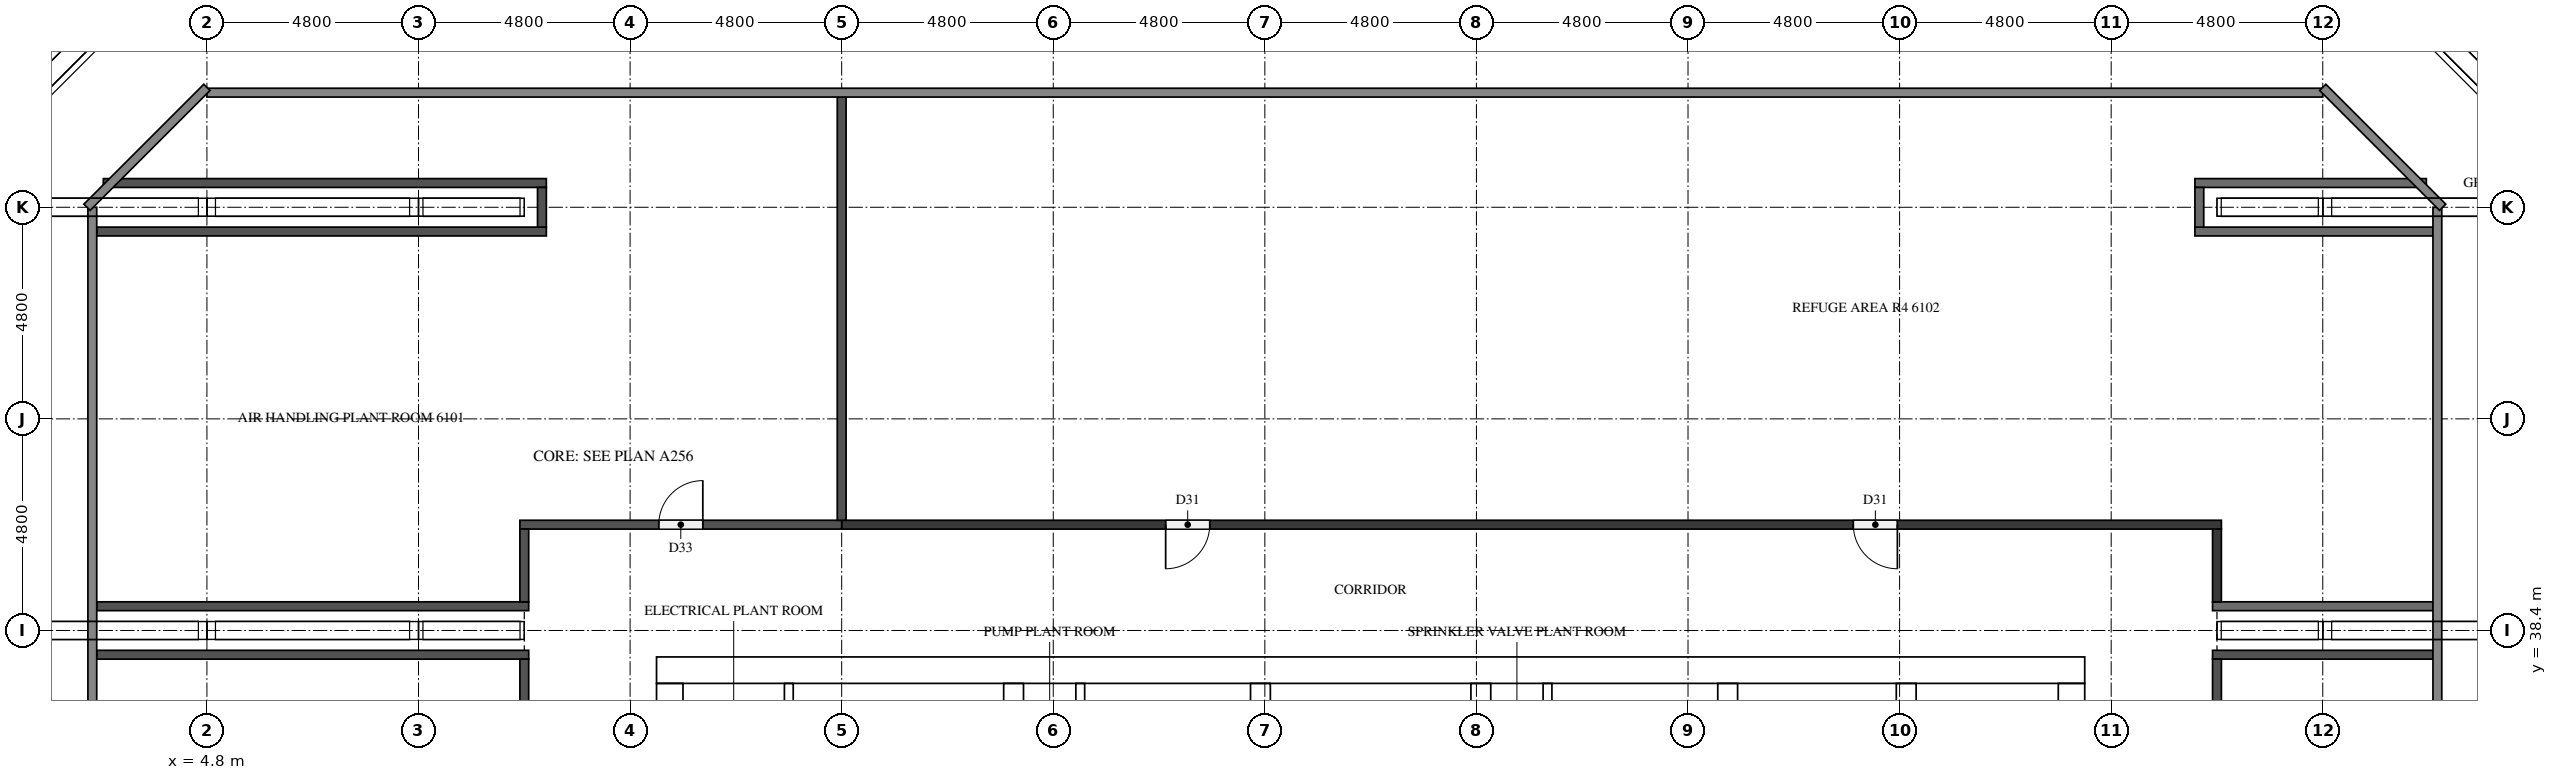
"""IFC4 building model, lengths in metres.
Left out: names, types, materials, properties, quantities, classifications, styles, units other than length and angle.
Written with IfcOpenShell. Run it as: python <this file> out.ifc"""

import sys

from ifc_helpers import new_model, si_unit, direction, frame, frame_2d, origin, place, context, subcontext, project, spatial, rectangle, extrude, element, fill, save


model = new_model("IFC4")
c1 = context("Model", 3, precision=1e-05, world=origin(), true_north=direction((0.0, 1.0)))
c2 = subcontext(c1, "Body", "Model", "MODEL_VIEW")
j1 = project(units=[si_unit("LENGTHUNIT", "METRE"), si_unit("PLANEANGLEUNIT", "RADIAN")], contexts=[c1])
p1 = place(None, origin())
s1 = spatial("IfcSite", under=j1, at=p1, CompositionType="ELEMENT")
p2 = place(p1, origin())
s2 = spatial("IfcBuilding", under=s1, at=p2, CompositionType="ELEMENT")
p3 = place(p2, frame((0.0, 0.0, 233.3)))
s3 = spatial("IfcBuildingStorey", under=s2, at=p3, CompositionType="ELEMENT", Elevation=233.3)
p4 = place(p3, frame((15.0, 37.5, 0.0), z_axis=(0.0, 0.0, 1.0), x_axis=(1.0, 0.0, 0.0)))
e1 = element("IfcWall", 1, at=p4, inside=s3, PredefinedType="SHEAR", context=c2, shape_type="SweptSolid", body=[
    extrude(rectangle(XDim=32.4, YDim=0.6, at=frame_2d((16.2, 0.0))), origin(), (0.0, 0.0, 1.0), 5.1),
])
p5 = place(p4, frame((15.3, 0.0, 0.0)))
e2 = element("IfcOpeningElement", 2, at=p5, cuts=e1, PredefinedType="OPENING", context=c2, shape_type="SweptSolid", body=[
    extrude(rectangle(XDim=1.8, YDim=2.1, at=frame_2d((0.9, 1.05))), frame((0.0, 0.31, 0.0), z_axis=(0.0, -1.0, 0.0), x_axis=(1.0, 0.0, 0.0)), (0.0, 0.0, 1.0), 0.62),
])
p6 = place(p4, frame((1.25, 0.0, 0.0)))
e3 = element("IfcOpeningElement", 3, at=p6, cuts=e1, PredefinedType="OPENING", context=c2, shape_type="SweptSolid", body=[
    extrude(rectangle(XDim=1.0, YDim=2.1, at=frame_2d((0.5, 1.05))), frame((0.0, 0.31, 0.0), z_axis=(0.0, -1.0, 0.0), x_axis=(1.0, 0.0, 0.0)), (0.0, 0.0, 1.0), 0.62),
])
p7 = place(p4, frame((4.988, 0.0, 0.0)))
e4 = element("IfcOpeningElement", 4, at=p7, cuts=e1, PredefinedType="OPENING", context=c2, shape_type="SweptSolid", body=[
    extrude(rectangle(XDim=1.0, YDim=2.1, at=frame_2d((0.5, 1.05))), frame((0.0, 0.31, 0.0), z_axis=(0.0, -1.0, 0.0), x_axis=(1.0, 0.0, 0.0)), (0.0, 0.0, 1.0), 0.62),
])
p8 = place(p3, frame((15.3, 15.6, 0.0), z_axis=(0.0, 0.0, 1.0), x_axis=(0.0, 1.0, 0.0)))
e5 = element("IfcWall", 5, at=p8, inside=s3, PredefinedType="SHEAR", context=c2, shape_type="SweptSolid", body=[
    extrude(rectangle(XDim=21.6, YDim=0.6, at=frame_2d((10.8, 0.0))), origin(), (0.0, 0.0, 1.0), 5.1),
])
p9 = place(p8, frame((5.16, 0.0, 0.0)))
e6 = element("IfcOpeningElement", 6, at=p9, cuts=e5, PredefinedType="OPENING", context=c2, shape_type="SweptSolid", body=[
    extrude(rectangle(XDim=1.2, YDim=2.1, at=frame_2d((0.6, 1.05))), frame((0.0, 0.31, 0.0), z_axis=(0.0, -1.0, 0.0), x_axis=(1.0, 0.0, 0.0)), (0.0, 0.0, 1.0), 0.62),
])
p10 = place(p3, frame((47.1, 15.6, 0.0), z_axis=(0.0, 0.0, 1.0), x_axis=(0.0, 1.0, 0.0)))
e7 = element("IfcWall", 7, at=p10, inside=s3, PredefinedType="SHEAR", context=c2, shape_type="SweptSolid", body=[
    extrude(rectangle(XDim=21.6, YDim=0.6, at=frame_2d((10.8, 0.0))), origin(), (0.0, 0.0, 1.0), 5.1),
])
p11 = place(p10, frame((10.5, 0.0, 0.0)))
e8 = element("IfcOpeningElement", 8, at=p11, cuts=e7, PredefinedType="OPENING", context=c2, shape_type="SweptSolid", body=[
    extrude(rectangle(XDim=1.2, YDim=2.1, at=frame_2d((0.6, 1.05))), frame((0.0, 0.31, 0.0), z_axis=(0.0, -1.0, 0.0), x_axis=(1.0, 0.0, 0.0)), (0.0, 0.0, 1.0), 0.62),
])
p12 = place(p3, frame((23.1, 15.6, 0.0), z_axis=(0.0, 0.0, 1.0), x_axis=(0.0, 1.0, 0.0)))
e9 = element("IfcWall", 9, at=p12, inside=s3, PredefinedType="SHEAR", context=c2, shape_type="SweptSolid", body=[
    extrude(rectangle(XDim=21.6, YDim=0.45, at=frame_2d((10.8, 0.0))), origin(), (0.0, 0.0, 1.0), 5.1),
])
p13 = place(p3, frame((39.3, 27.75, 0.0), z_axis=(0.0, 0.0, 1.0), x_axis=(0.0, 1.0, 0.0)))
e10 = element("IfcWall", 10, at=p13, inside=s3, PredefinedType="SHEAR", context=c2, shape_type="SweptSolid", body=[
    extrude(rectangle(XDim=9.45, YDim=0.45, at=frame_2d((4.725, 0.0))), origin(), (0.0, 0.0, 1.0), 5.1),
])
p14 = place(p3, frame((43.35, 27.75, 0.0), z_axis=(0.0, 0.0, 1.0), x_axis=(0.0, 1.0, 0.0)))
e11 = element("IfcWall", 11, at=p14, inside=s3, PredefinedType="SHEAR", context=c2, shape_type="SweptSolid", body=[
    extrude(rectangle(XDim=9.45, YDim=0.45, at=frame_2d((4.725, 0.0))), origin(), (0.0, 0.0, 1.0), 5.1),
])
p15 = place(p14, frame((7.65, 0.0, 0.0)))
e12 = element("IfcOpeningElement", 12, at=p15, cuts=e11, PredefinedType="OPENING", context=c2, shape_type="SweptSolid", body=[
    extrude(rectangle(XDim=1.2, YDim=2.1, at=frame_2d((0.6, 1.05))), frame((0.0, 0.235, 0.0), z_axis=(0.0, -1.0, 0.0), x_axis=(1.0, 0.0, 0.0)), (0.0, 0.0, 1.0), 0.47),
])
for number, where, z_axis, x_axis in (
    (13, (28.7, 33.775, 0.0), (0.0, 0.0, 1.0), (0.0, 1.0, 0.0)),
    (14, (33.7, 33.775, 0.0), (0.0, 0.0, 1.0), (0.0, 1.0, 0.0)),
):
    element("IfcWall", number, at=place(p3, frame(where, z_axis=z_axis, x_axis=x_axis)), inside=s3, PredefinedType="SHEAR", context=c2, shape_type="SweptSolid", body=[
        extrude(rectangle(XDim=3.425, YDim=0.45, at=frame_2d((1.712, 0.0))), origin(), (0.0, 0.0, 1.0), 5.1),
    ])
p16 = place(p3, frame((18.001, 31.475, 0.0), z_axis=(0.0, 0.0, 1.0), x_axis=(0.0, 1.0, 0.0)))
e15 = element("IfcWall", 15, at=p16, inside=s3, PredefinedType="PARTITIONING", context=c2, shape_type="SweptSolid", body=[
    extrude(rectangle(XDim=5.725, YDim=0.2, at=frame_2d((2.862, 0.0))), origin(), (0.0, 0.0, 1.0), 5.1),
])
for number, where, z_axis, x_axis in (
    (16, (24.613, 33.775, 0.0), (0.0, 0.0, 1.0), (0.0, 1.0, 0.0)),
    (17, (35.212, 33.775, 0.0), (0.0, 0.0, 1.0), (0.0, 1.0, 0.0)),
):
    element("IfcWall", number, at=place(p3, frame(where, z_axis=z_axis, x_axis=x_axis)), inside=s3, PredefinedType="PARTITIONING", context=c2, shape_type="SweptSolid", body=[
        extrude(rectangle(XDim=3.425, YDim=0.2, at=frame_2d((1.712, 0.0))), origin(), (0.0, 0.0, 1.0), 5.1),
    ])
p17 = place(p3, frame((2.3, 37.85, 0.0), z_axis=(0.0, 0.0, 1.0), x_axis=(1.0, 0.0, 0.0)))
e18 = element("IfcWall", 18, at=p17, inside=s3, PredefinedType="PARTITIONING", context=c2, shape_type="SweptSolid", body=[
    extrude(rectangle(XDim=9.8, YDim=0.2, at=frame_2d((4.9, 0.0))), origin(), (0.0, 0.0, 1.0), 5.1),
])
for number, where, z_axis, x_axis in (
    (19, (50.3, 37.85, 0.0), (0.0, 0.0, 1.0), (1.0, 0.0, 0.0)),
    (20, (50.3, 38.95, 0.0), (0.0, 0.0, 1.0), (1.0, 0.0, 0.0)),
):
    element("IfcWall", number, at=place(p3, frame(where, z_axis=z_axis, x_axis=x_axis)), inside=s3, PredefinedType="PARTITIONING", context=c2, shape_type="SweptSolid", body=[
        extrude(rectangle(XDim=5.0, YDim=0.2, at=frame_2d((2.5, 0.0))), origin(), (0.0, 0.0, 1.0), 5.1),
    ])
p18 = place(p3, frame((2.3, 38.95, 0.0), z_axis=(0.0, 0.0, 1.0), x_axis=(1.0, 0.0, 0.0)))
e21 = element("IfcWall", 21, at=p18, inside=s3, PredefinedType="PARTITIONING", context=c2, shape_type="SweptSolid", body=[
    extrude(rectangle(XDim=9.8, YDim=0.2, at=frame_2d((4.9, 0.0))), origin(), (0.0, 0.0, 1.0), 5.1),
])
p19 = place(p3, frame((50.5, 40.8, 0.0), z_axis=(0.0, 0.0, 1.0), x_axis=(-1.0, 0.0, 0.0)))
e22 = element("IfcWall", 22, at=p19, inside=s3, PredefinedType="PARTITIONING", context=c2, shape_type="SweptSolid", body=[
    extrude(rectangle(XDim=31.3, YDim=0.2, at=frame_2d((15.65, 0.0))), origin(), (0.0, 0.0, 1.0), 5.1),
])
p20 = place(p19, frame((22.95, 0.0, 0.0)))
e23 = element("IfcOpeningElement", 23, at=p20, cuts=e22, PredefinedType="OPENING", context=c2, shape_type="SweptSolid", body=[
    extrude(rectangle(XDim=1.0, YDim=2.1, at=frame_2d((0.5, 1.05))), frame((0.0, 0.11, 0.0), z_axis=(0.0, -1.0, 0.0), x_axis=(1.0, 0.0, 0.0)), (0.0, 0.0, 1.0), 0.22),
])
p21 = place(p19, frame((7.35, 0.0, 0.0)))
e24 = element("IfcOpeningElement", 24, at=p21, cuts=e22, PredefinedType="OPENING", context=c2, shape_type="SweptSolid", body=[
    extrude(rectangle(XDim=1.0, YDim=2.1, at=frame_2d((0.5, 1.05))), frame((0.0, 0.11, 0.0), z_axis=(0.0, -1.0, 0.0), x_axis=(1.0, 0.0, 0.0)), (0.0, 0.0, 1.0), 0.22),
])
p22 = place(p3, frame((11.9, 40.8, 0.0), z_axis=(0.0, 0.0, 1.0), x_axis=(1.0, 0.0, 0.0)))
e25 = element("IfcWall", 25, at=p22, inside=s3, PredefinedType="PARTITIONING", context=c2, shape_type="SweptSolid", body=[
    extrude(rectangle(XDim=7.3, YDim=0.2, at=frame_2d((3.65, 0.0))), origin(), (0.0, 0.0, 1.0), 5.1),
])
p23 = place(p22, frame((3.15, 0.0, 0.0)))
e26 = element("IfcOpeningElement", 26, at=p23, cuts=e25, PredefinedType="OPENING", context=c2, shape_type="SweptSolid", body=[
    extrude(rectangle(XDim=1.0, YDim=2.1, at=frame_2d((0.5, 1.05))), frame((0.0, 0.11, 0.0), z_axis=(0.0, -1.0, 0.0), x_axis=(1.0, 0.0, 0.0)), (0.0, 0.0, 1.0), 0.22),
])
p24 = place(p3, frame((49.9, 47.45, 0.0), z_axis=(0.0, 0.0, 1.0), x_axis=(1.0, 0.0, 0.0)))
e27 = element("IfcWall", 27, at=p24, inside=s3, PredefinedType="PARTITIONING", context=c2, shape_type="SweptSolid", body=[
    extrude(rectangle(XDim=5.4, YDim=0.2, at=frame_2d((2.7, 0.0))), origin(), (0.0, 0.0, 1.0), 5.1),
])
p25 = place(p3, frame((2.3, 47.45, 0.0), z_axis=(0.0, 0.0, 1.0), x_axis=(1.0, 0.0, 0.0)))
e28 = element("IfcWall", 28, at=p25, inside=s3, PredefinedType="PARTITIONING", context=c2, shape_type="SweptSolid", body=[
    extrude(rectangle(XDim=10.2, YDim=0.2, at=frame_2d((5.1, 0.0))), origin(), (0.0, 0.0, 1.0), 5.1),
])
p26 = place(p3, frame((49.9, 48.55, 0.0), z_axis=(0.0, 0.0, 1.0), x_axis=(1.0, 0.0, 0.0)))
e29 = element("IfcWall", 29, at=p26, inside=s3, PredefinedType="PARTITIONING", context=c2, shape_type="SweptSolid", body=[
    extrude(rectangle(XDim=5.25, YDim=0.2, at=frame_2d((2.625, 0.0))), origin(), (0.0, 0.0, 1.0), 5.1),
])
p27 = place(p3, frame((2.45, 48.55, 0.0), z_axis=(0.0, 0.0, 1.0), x_axis=(1.0, 0.0, 0.0)))
e30 = element("IfcWall", 30, at=p27, inside=s3, PredefinedType="PARTITIONING", context=c2, shape_type="SweptSolid", body=[
    extrude(rectangle(XDim=10.05, YDim=0.2, at=frame_2d((5.025, 0.0))), origin(), (0.0, 0.0, 1.0), 5.1),
])
p28 = place(p3, frame((12.0, 29.45, 0.0), z_axis=(0.0, 0.0, 1.0), x_axis=(0.0, 1.0, 0.0)))
e31 = element("IfcWall", 31, at=p28, inside=s3, PredefinedType="PARTITIONING", context=c2, shape_type="SweptSolid", body=[
    extrude(rectangle(XDim=8.3, YDim=0.2, at=frame_2d((4.15, 0.0))), origin(), (0.0, 0.0, 1.0), 5.1),
])
p29 = place(p28, frame((3.65, 0.0, 0.0)))
e32 = element("IfcOpeningElement", 32, at=p29, cuts=e31, PredefinedType="OPENING", context=c2, shape_type="SweptSolid", body=[
    extrude(rectangle(XDim=1.0, YDim=2.1, at=frame_2d((0.5, 1.05))), frame((0.0, 0.11, 0.0), z_axis=(0.0, -1.0, 0.0), x_axis=(1.0, 0.0, 0.0)), (0.0, 0.0, 1.0), 0.22),
])
p30 = place(p3, frame((12.0, 39.05, 0.0), z_axis=(0.0, 0.0, 1.0), x_axis=(0.0, 1.0, 0.0)))
e33 = element("IfcWall", 33, at=p30, inside=s3, PredefinedType="PARTITIONING", context=c2, shape_type="SweptSolid", body=[
    extrude(rectangle(XDim=1.65, YDim=0.2, at=frame_2d((0.825, 0.0))), origin(), (0.0, 0.0, 1.0), 5.1),
])
p31 = place(p3, frame((12.4, 47.55, 0.0), z_axis=(0.0, 0.0, 1.0), x_axis=(0.0, 1.0, 0.0)))
e34 = element("IfcWall", 34, at=p31, inside=s3, PredefinedType="PARTITIONING", context=c2, shape_type="SweptSolid", body=[
    extrude(rectangle(XDim=0.9, YDim=0.2, at=frame_2d((0.45, 0.0))), origin(), (0.0, 0.0, 1.0), 5.1),
])
p32 = place(p3, frame((19.2, 40.9, 0.0), z_axis=(0.0, 0.0, 1.0), x_axis=(0.0, 1.0, 0.0)))
e35 = element("IfcWall", 35, at=p32, inside=s3, PredefinedType="PARTITIONING", context=c2, shape_type="SweptSolid", body=[
    extrude(rectangle(XDim=9.6, YDim=0.2, at=frame_2d((4.8, 0.0))), origin(), (0.0, 0.0, 1.0), 5.1),
])
p33 = place(p3, frame((50.0, 47.55, 0.0), z_axis=(0.0, 0.0, 1.0), x_axis=(0.0, 1.0, 0.0)))
e36 = element("IfcWall", 36, at=p33, inside=s3, PredefinedType="PARTITIONING", context=c2, shape_type="SweptSolid", body=[
    extrude(rectangle(XDim=0.9, YDim=0.2, at=frame_2d((0.45, 0.0))), origin(), (0.0, 0.0, 1.0), 5.1),
])
p34 = place(p3, frame((50.4, 39.05, 0.0), z_axis=(0.0, 0.0, 1.0), x_axis=(0.0, 1.0, 0.0)))
e37 = element("IfcWall", 37, at=p34, inside=s3, PredefinedType="PARTITIONING", context=c2, shape_type="SweptSolid", body=[
    extrude(rectangle(XDim=1.65, YDim=0.2, at=frame_2d((0.825, 0.0))), origin(), (0.0, 0.0, 1.0), 5.1),
])
p35 = place(p3, frame((50.4, 37.75, 0.0), z_axis=(0.0, 0.0, 1.0), x_axis=(0.0, -1.0, 0.0)))
e38 = element("IfcWall", 38, at=p35, inside=s3, PredefinedType="PARTITIONING", context=c2, shape_type="SweptSolid", body=[
    extrude(rectangle(XDim=8.3, YDim=0.2, at=frame_2d((4.15, 0.0))), origin(), (0.0, 0.0, 1.0), 5.1),
])
p36 = place(p35, frame((3.65, 0.0, 0.0)))
e39 = element("IfcOpeningElement", 39, at=p36, cuts=e38, PredefinedType="OPENING", context=c2, shape_type="SweptSolid", body=[
    extrude(rectangle(XDim=1.0, YDim=2.1, at=frame_2d((0.5, 1.05))), frame((0.0, 0.11, 0.0), z_axis=(0.0, -1.0, 0.0), x_axis=(1.0, 0.0, 0.0)), (0.0, 0.0, 1.0), 0.22),
])
p37 = place(p5, origin())
e40 = element("IfcDoor", 40, at=p37, inside=s3, OperationType="DOUBLE_DOOR_SINGLE_SWING", PredefinedType="DOOR", context=c2, shape_type="SweptSolid", body=[
    extrude(rectangle(XDim=1.8, YDim=2.1, at=frame_2d((0.9, 1.05))), frame((0.0, 0.025, 0.0), z_axis=(0.0, -1.0, 0.0), x_axis=(1.0, 0.0, 0.0)), (0.0, 0.0, 1.0), 0.05),
])
fill(e2, e40)
p38 = place(p6, origin())
e41 = element("IfcDoor", 41, at=p38, inside=s3, OperationType="SINGLE_SWING_RIGHT", PredefinedType="DOOR", context=c2, shape_type="SweptSolid", body=[
    extrude(rectangle(XDim=1.0, YDim=2.1, at=frame_2d((0.5, 1.05))), frame((0.0, 0.025, 0.0), z_axis=(0.0, -1.0, 0.0), x_axis=(1.0, 0.0, 0.0)), (0.0, 0.0, 1.0), 0.05),
])
fill(e3, e41)
p39 = place(p7, origin())
e42 = element("IfcDoor", 42, at=p39, inside=s3, OperationType="SINGLE_SWING_LEFT", PredefinedType="DOOR", context=c2, shape_type="SweptSolid", body=[
    extrude(rectangle(XDim=1.0, YDim=2.1, at=frame_2d((0.5, 1.05))), frame((0.0, 0.025, 0.0), z_axis=(0.0, -1.0, 0.0), x_axis=(1.0, 0.0, 0.0)), (0.0, 0.0, 1.0), 0.05),
])
fill(e4, e42)
p40 = place(p23, origin())
e43 = element("IfcDoor", 43, at=p40, inside=s3, OperationType="SINGLE_SWING_RIGHT", PredefinedType="DOOR", context=c2, shape_type="SweptSolid", body=[
    extrude(rectangle(XDim=1.0, YDim=2.1, at=frame_2d((0.5, 1.05))), frame((0.0, 0.025, 0.0), z_axis=(0.0, -1.0, 0.0), x_axis=(1.0, 0.0, 0.0)), (0.0, 0.0, 1.0), 0.05),
])
fill(e26, e43)
p41 = place(p20, origin())
e44 = element("IfcDoor", 44, at=p41, inside=s3, OperationType="SINGLE_SWING_RIGHT", PredefinedType="DOOR", context=c2, shape_type="SweptSolid", body=[
    extrude(rectangle(XDim=1.0, YDim=2.1, at=frame_2d((0.5, 1.05))), frame((0.0, 0.025, 0.0), z_axis=(0.0, -1.0, 0.0), x_axis=(1.0, 0.0, 0.0)), (0.0, 0.0, 1.0), 0.05),
])
fill(e23, e44)
p42 = place(p21, origin())
e45 = element("IfcDoor", 45, at=p42, inside=s3, OperationType="SINGLE_SWING_LEFT", PredefinedType="DOOR", context=c2, shape_type="SweptSolid", body=[
    extrude(rectangle(XDim=1.0, YDim=2.1, at=frame_2d((0.5, 1.05))), frame((0.0, 0.025, 0.0), z_axis=(0.0, -1.0, 0.0), x_axis=(1.0, 0.0, 0.0)), (0.0, 0.0, 1.0), 0.05),
])
fill(e24, e45)
save(model, sys.argv[1])
